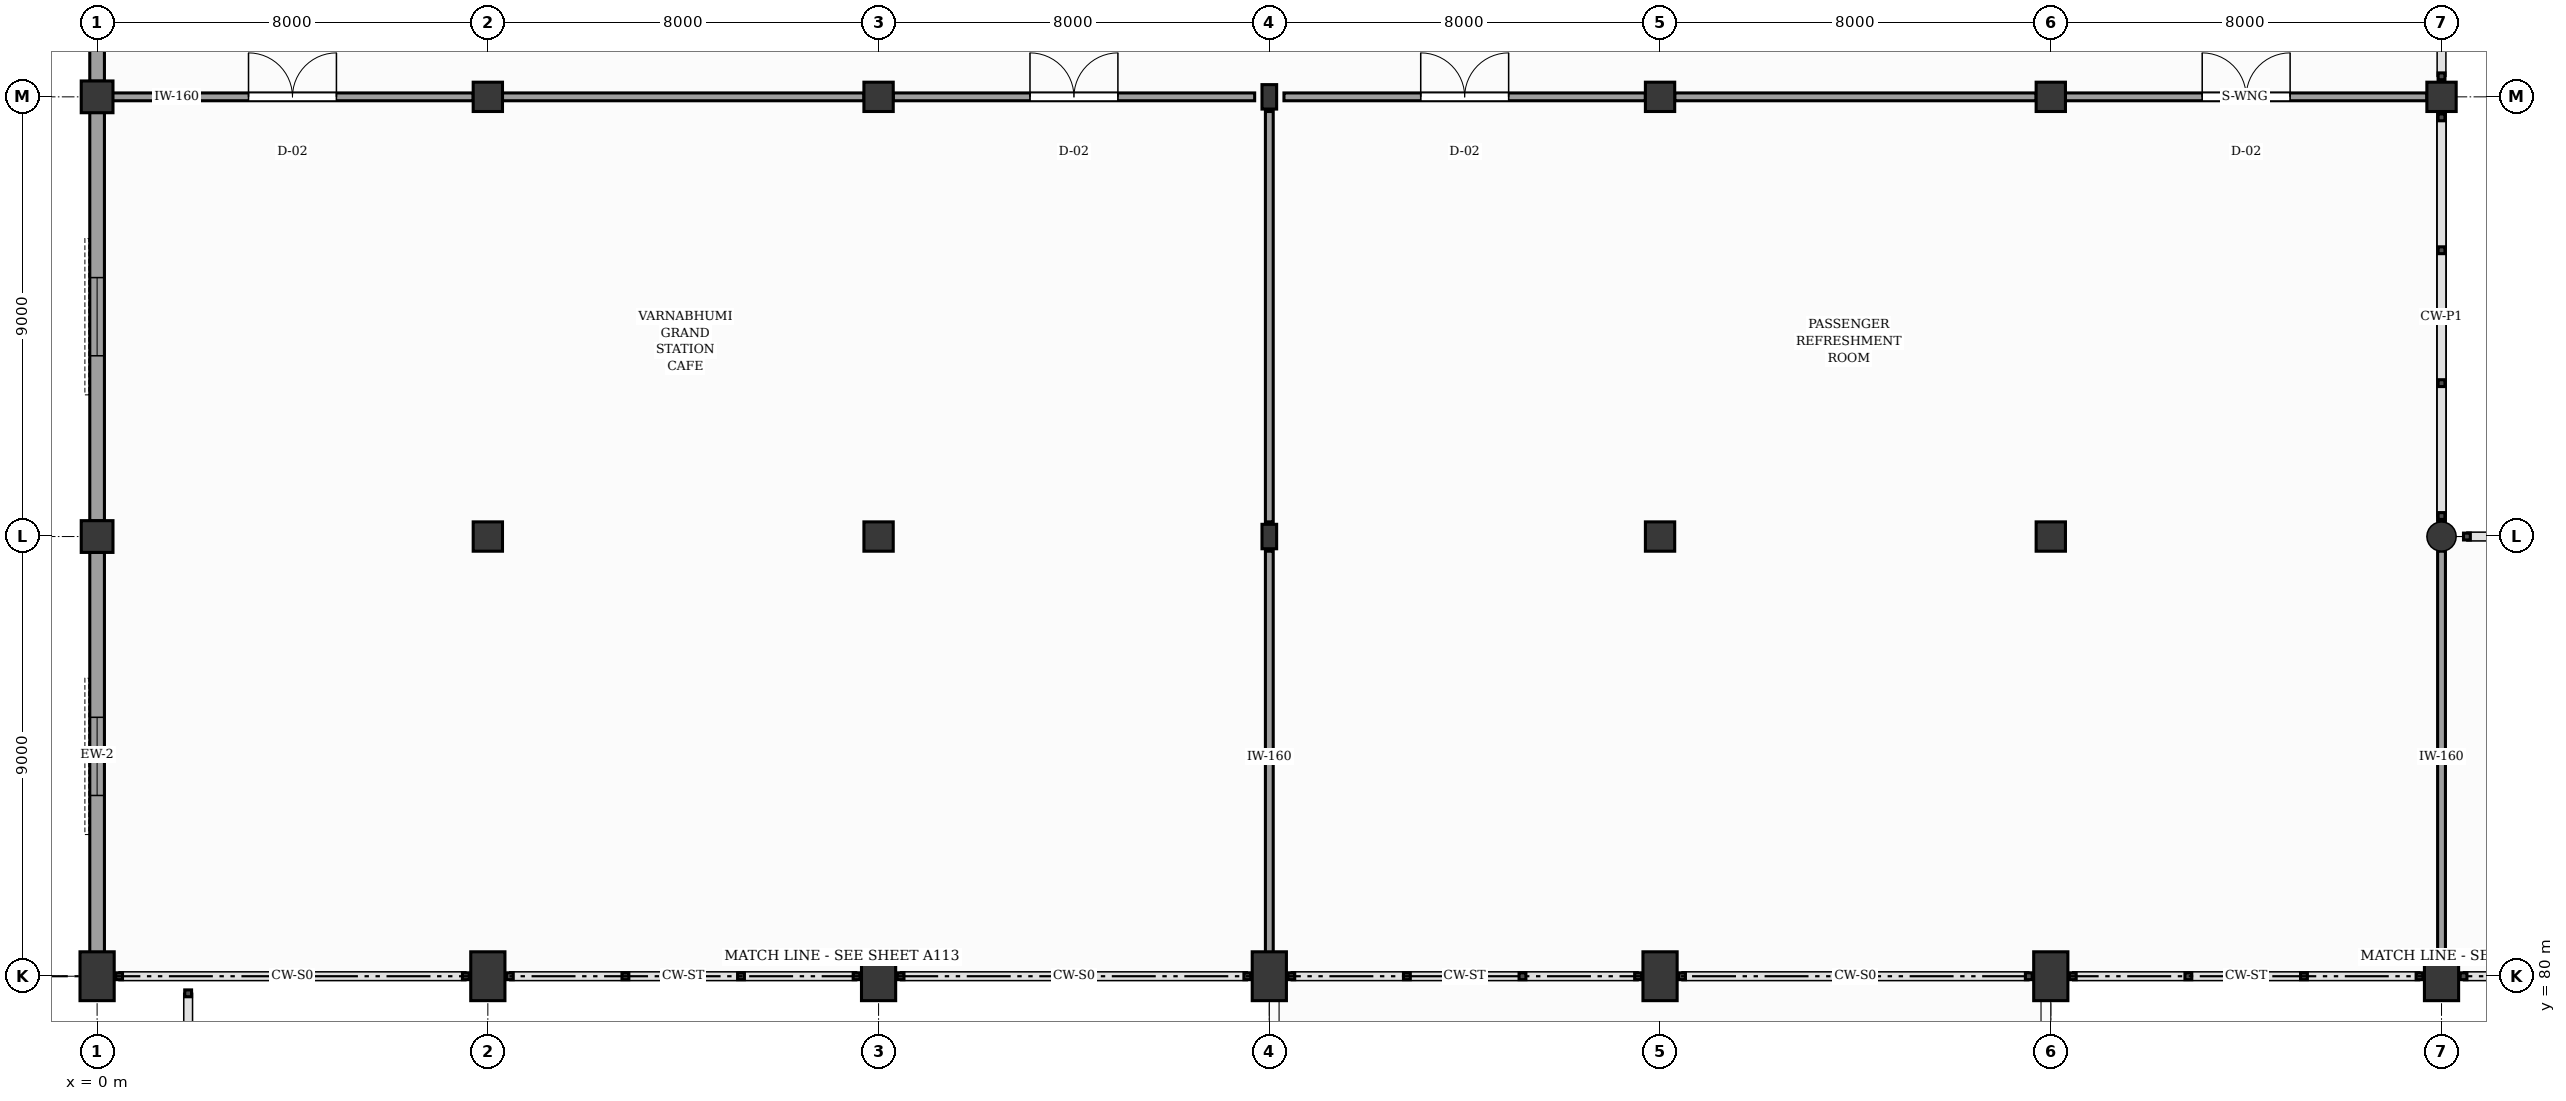
"""IFC4 building model, lengths in metres.
Left out: names, types, materials, properties, quantities, classifications, styles, units other than length and angle.
Written with IfcOpenShell. Run it as: python <this file> out.ifc"""

import sys

from ifc_helpers import new_model, si_unit, direction, frame, frame_2d, origin, origin_2d, place, context, subcontext, project, spatial, rectangle, circle, i_section, extrude, element, fill, save


model = new_model("IFC4")
c1 = context("Model", 3, precision=1e-05, world=origin(), true_north=direction((0.0, 1.0)))
c2 = subcontext(c1, "Body", "Model", "MODEL_VIEW")
j1 = project(units=[si_unit("LENGTHUNIT", "METRE"), si_unit("PLANEANGLEUNIT", "RADIAN")], contexts=[c1])
p1 = place(None, origin())
s1 = spatial("IfcSite", under=j1, at=p1, CompositionType="ELEMENT")
p2 = place(p1, origin())
s2 = spatial("IfcBuilding", under=s1, at=p2, CompositionType="ELEMENT")
p3 = place(p2, frame((0.0, 0.0, 4.8)))
s3 = spatial("IfcBuildingStorey", under=s2, at=p3, CompositionType="ELEMENT", Elevation=4.8)
p4 = place(p3, frame((0.0, 80.0, 0.0), z_axis=(0.0, 0.0, 1.0), x_axis=(1.0, 0.0, 0.0)))
e1 = element("IfcColumn", 1, at=p4, inside=s3, PredefinedType="COLUMN", context=c2, shape_type="SweptSolid", body=[
    extrude(rectangle(XDim=0.7, YDim=1.0, at=origin_2d()), origin(), (0.0, 0.0, 1.0), 4.8),
])
for number, where, z_axis, x_axis in (
    (2, (0.0, 89.0, 0.0), (0.0, 0.0, 1.0), (1.0, 0.0, 0.0)),
    (3, (0.0, 98.0, 0.0), (0.0, 0.0, 1.0), (1.0, 0.0, 0.0)),
):
    element("IfcColumn", number, at=place(p3, frame(where, z_axis=z_axis, x_axis=x_axis)), inside=s3, PredefinedType="COLUMN", context=c2, shape_type="SweptSolid", body=[
        extrude(rectangle(XDim=0.65, YDim=0.65, at=origin_2d()), origin(), (0.0, 0.0, 1.0), 4.8),
    ])
p5 = place(p3, frame((8.0, 80.0, 0.0), z_axis=(0.0, 0.0, 1.0), x_axis=(1.0, 0.0, 0.0)))
e4 = element("IfcColumn", 4, at=p5, inside=s3, PredefinedType="COLUMN", context=c2, shape_type="SweptSolid", body=[
    extrude(rectangle(XDim=0.7, YDim=1.0, at=origin_2d()), origin(), (0.0, 0.0, 1.0), 4.8),
])
for number, where, z_axis, x_axis in (
    (5, (8.0, 89.0, 0.0), (0.0, 0.0, 1.0), (1.0, 0.0, 0.0)),
    (6, (8.0, 98.0, 0.0), (0.0, 0.0, 1.0), (1.0, 0.0, 0.0)),
):
    element("IfcColumn", number, at=place(p3, frame(where, z_axis=z_axis, x_axis=x_axis)), inside=s3, PredefinedType="COLUMN", context=c2, shape_type="SweptSolid", body=[
        extrude(rectangle(XDim=0.6, YDim=0.6, at=origin_2d()), origin(), (0.0, 0.0, 1.0), 4.8),
    ])
p6 = place(p3, frame((16.0, 80.0, 0.0), z_axis=(0.0, 0.0, 1.0), x_axis=(1.0, 0.0, 0.0)))
e7 = element("IfcColumn", 7, at=p6, inside=s3, PredefinedType="COLUMN", context=c2, shape_type="SweptSolid", body=[
    extrude(rectangle(XDim=0.7, YDim=1.0, at=origin_2d()), origin(), (0.0, 0.0, 1.0), 4.8),
])
for number, where, z_axis, x_axis in (
    (8, (16.0, 89.0, 0.0), (0.0, 0.0, 1.0), (1.0, 0.0, 0.0)),
    (9, (16.0, 98.0, 0.0), (0.0, 0.0, 1.0), (1.0, 0.0, 0.0)),
):
    element("IfcColumn", number, at=place(p3, frame(where, z_axis=z_axis, x_axis=x_axis)), inside=s3, PredefinedType="COLUMN", context=c2, shape_type="SweptSolid", body=[
        extrude(rectangle(XDim=0.6, YDim=0.6, at=origin_2d()), origin(), (0.0, 0.0, 1.0), 4.8),
    ])
p7 = place(p3, frame((24.0, 80.0, 0.0), z_axis=(0.0, 0.0, 1.0), x_axis=(1.0, 0.0, 0.0)))
e10 = element("IfcColumn", 10, at=p7, inside=s3, PredefinedType="COLUMN", context=c2, shape_type="SweptSolid", body=[
    extrude(rectangle(XDim=0.7, YDim=1.0, at=origin_2d()), origin(), (0.0, 0.0, 1.0), 4.8),
])
for number, where, z_axis, x_axis in (
    (11, (24.0, 89.0, 0.0), (0.0, 0.0, 1.0), (1.0, 0.0, 0.0)),
    (12, (24.0, 98.0, 0.0), (0.0, 0.0, 1.0), (1.0, 0.0, 0.0)),
):
    element("IfcColumn", number, at=place(p3, frame(where, z_axis=z_axis, x_axis=x_axis)), inside=s3, PredefinedType="COLUMN", context=c2, shape_type="SweptSolid", body=[
        extrude(i_section(OverallWidth=0.3, OverallDepth=0.5, WebThickness=0.014, FlangeThickness=0.028, FilletRadius=0.027, at=origin_2d()), origin(), (0.0, 0.0, 1.0), 4.8),
    ])
p8 = place(p3, frame((32.0, 80.0, 0.0), z_axis=(0.0, 0.0, 1.0), x_axis=(1.0, 0.0, 0.0)))
e13 = element("IfcColumn", 13, at=p8, inside=s3, PredefinedType="COLUMN", context=c2, shape_type="SweptSolid", body=[
    extrude(rectangle(XDim=0.7, YDim=1.0, at=origin_2d()), origin(), (0.0, 0.0, 1.0), 4.8),
])
for number, where, z_axis, x_axis in (
    (14, (32.0, 89.0, 0.0), (0.0, 0.0, 1.0), (1.0, 0.0, 0.0)),
    (15, (32.0, 98.0, 0.0), (0.0, 0.0, 1.0), (1.0, 0.0, 0.0)),
):
    element("IfcColumn", number, at=place(p3, frame(where, z_axis=z_axis, x_axis=x_axis)), inside=s3, PredefinedType="COLUMN", context=c2, shape_type="SweptSolid", body=[
        extrude(rectangle(XDim=0.6, YDim=0.6, at=origin_2d()), origin(), (0.0, 0.0, 1.0), 4.8),
    ])
p9 = place(p3, frame((40.0, 80.0, 0.0), z_axis=(0.0, 0.0, 1.0), x_axis=(1.0, 0.0, 0.0)))
e16 = element("IfcColumn", 16, at=p9, inside=s3, PredefinedType="COLUMN", context=c2, shape_type="SweptSolid", body=[
    extrude(rectangle(XDim=0.7, YDim=1.0, at=origin_2d()), origin(), (0.0, 0.0, 1.0), 4.8),
])
for number, where, z_axis, x_axis in (
    (17, (40.0, 89.0, 0.0), (0.0, 0.0, 1.0), (1.0, 0.0, 0.0)),
    (18, (40.0, 98.0, 0.0), (0.0, 0.0, 1.0), (1.0, 0.0, 0.0)),
):
    element("IfcColumn", number, at=place(p3, frame(where, z_axis=z_axis, x_axis=x_axis)), inside=s3, PredefinedType="COLUMN", context=c2, shape_type="SweptSolid", body=[
        extrude(rectangle(XDim=0.6, YDim=0.6, at=origin_2d()), origin(), (0.0, 0.0, 1.0), 4.8),
    ])
p10 = place(p3, frame((48.0, 80.0, 0.0), z_axis=(0.0, 0.0, 1.0), x_axis=(1.0, 0.0, 0.0)))
e19 = element("IfcColumn", 19, at=p10, inside=s3, PredefinedType="COLUMN", context=c2, shape_type="SweptSolid", body=[
    extrude(rectangle(XDim=0.7, YDim=1.0, at=origin_2d()), origin(), (0.0, 0.0, 1.0), 4.8),
])
p11 = place(p3, frame((48.0, 89.0, 0.0), z_axis=(0.0, 0.0, 1.0), x_axis=(1.0, 0.0, 0.0)))
e20 = element("IfcColumn", 20, at=p11, inside=s3, PredefinedType="COLUMN", context=c2, shape_type="SweptSolid", body=[
    extrude(circle(Radius=0.3, at=origin_2d()), origin(), (0.0, 0.0, 1.0), 4.8),
])
p12 = place(p3, frame((48.0, 98.0, 0.0), z_axis=(0.0, 0.0, 1.0), x_axis=(1.0, 0.0, 0.0)))
e21 = element("IfcColumn", 21, at=p12, inside=s3, PredefinedType="COLUMN", context=c2, shape_type="SweptSolid", body=[
    extrude(rectangle(XDim=0.6, YDim=0.6, at=origin_2d()), origin(), (0.0, 0.0, 1.0), 4.8),
])
p13 = place(p3, frame((0.0, 80.4, 0.0), z_axis=(0.0, 0.0, 1.0), x_axis=(0.0, 1.0, 0.0)))
e22 = element("IfcWall", 22, at=p13, inside=s3, PredefinedType="SOLIDWALL", context=c2, shape_type="SweptSolid", body=[
    extrude(rectangle(XDim=8.28, YDim=0.3, at=frame_2d((4.14, 0.0))), origin(), (0.0, 0.0, 1.0), 3.31),
])
p14 = place(p13, frame((3.3, 0.0, 0.95)))
e23 = element("IfcOpeningElement", 23, at=p14, cuts=e22, PredefinedType="OPENING", context=c2, shape_type="SweptSolid", body=[
    extrude(rectangle(XDim=1.6, YDim=2.1, at=frame_2d((0.8, 1.05))), frame((0.0, 0.16, 0.0), z_axis=(0.0, -1.0, 0.0), x_axis=(1.0, 0.0, 0.0)), (0.0, 0.0, 1.0), 0.32),
])
p15 = place(p3, frame((0.0, 89.32, 0.0), z_axis=(0.0, 0.0, 1.0), x_axis=(0.0, 1.0, 0.0)))
e24 = element("IfcWall", 24, at=p15, inside=s3, PredefinedType="SOLIDWALL", context=c2, shape_type="SweptSolid", body=[
    extrude(rectangle(XDim=8.36, YDim=0.3, at=frame_2d((4.18, 0.0))), origin(), (0.0, 0.0, 1.0), 3.71),
])
p16 = place(p15, frame((3.38, 0.0, 0.95)))
e25 = element("IfcOpeningElement", 25, at=p16, cuts=e24, PredefinedType="OPENING", context=c2, shape_type="SweptSolid", body=[
    extrude(rectangle(XDim=1.6, YDim=2.1, at=frame_2d((0.8, 1.05))), frame((0.0, 0.16, 0.0), z_axis=(0.0, -1.0, 0.0), x_axis=(1.0, 0.0, 0.0)), (0.0, 0.0, 1.0), 0.32),
])
p17 = place(p3, frame((0.0, 98.32, 0.0), z_axis=(0.0, 0.0, 1.0), x_axis=(0.0, 1.0, 0.0)))
e26 = element("IfcWall", 26, at=p17, inside=s3, PredefinedType="SOLIDWALL", context=c2, shape_type="SweptSolid", body=[
    extrude(rectangle(XDim=8.36, YDim=0.3, at=frame_2d((4.18, 0.0))), origin(), (0.0, 0.0, 1.0), 3.71),
])
p18 = place(p17, frame((3.38, 0.0, 0.95)))
e27 = element("IfcOpeningElement", 27, at=p18, cuts=e26, PredefinedType="OPENING", context=c2, shape_type="SweptSolid", body=[
    extrude(rectangle(XDim=1.6, YDim=2.1, at=frame_2d((0.8, 1.05))), frame((0.0, 0.16, 0.0), z_axis=(0.0, -1.0, 0.0), x_axis=(1.0, 0.0, 0.0)), (0.0, 0.0, 1.0), 0.32),
])
p19 = place(p3, frame((0.3, 98.0, 0.0), z_axis=(0.0, 0.0, 1.0), x_axis=(1.0, 0.0, 0.0)))
e28 = element("IfcWall", 28, at=p19, inside=s3, PredefinedType="PARTITIONING", context=c2, shape_type="SweptSolid", body=[
    extrude(rectangle(XDim=7.4, YDim=0.16, at=frame_2d((3.7, 0.0))), origin(), (0.0, 0.0, 1.0), 3.7),
])
p20 = place(p19, frame((2.8, 0.0, 0.0)))
e29 = element("IfcOpeningElement", 29, at=p20, cuts=e28, PredefinedType="OPENING", context=c2, shape_type="SweptSolid", body=[
    extrude(rectangle(XDim=1.8, YDim=2.25, at=frame_2d((0.9, 1.125))), frame((0.0, 0.09, 0.0), z_axis=(0.0, -1.0, 0.0), x_axis=(1.0, 0.0, 0.0)), (0.0, 0.0, 1.0), 0.18),
])
p21 = place(p3, frame((8.3, 98.0, 0.0), z_axis=(0.0, 0.0, 1.0), x_axis=(1.0, 0.0, 0.0)))
e30 = element("IfcWall", 30, at=p21, inside=s3, PredefinedType="PARTITIONING", context=c2, shape_type="SweptSolid", body=[
    extrude(rectangle(XDim=7.4, YDim=0.16, at=frame_2d((3.7, 0.0))), origin(), (0.0, 0.0, 1.0), 3.7),
])
p22 = place(p3, frame((16.3, 98.0, 0.0), z_axis=(0.0, 0.0, 1.0), x_axis=(1.0, 0.0, 0.0)))
e31 = element("IfcWall", 31, at=p22, inside=s3, PredefinedType="PARTITIONING", context=c2, shape_type="SweptSolid", body=[
    extrude(rectangle(XDim=7.4, YDim=0.16, at=frame_2d((3.7, 0.0))), origin(), (0.0, 0.0, 1.0), 3.7),
])
p23 = place(p22, frame((2.8, 0.0, 0.0)))
e32 = element("IfcOpeningElement", 32, at=p23, cuts=e31, PredefinedType="OPENING", context=c2, shape_type="SweptSolid", body=[
    extrude(rectangle(XDim=1.8, YDim=2.25, at=frame_2d((0.9, 1.125))), frame((0.0, 0.09, 0.0), z_axis=(0.0, -1.0, 0.0), x_axis=(1.0, 0.0, 0.0)), (0.0, 0.0, 1.0), 0.18),
])
p24 = place(p3, frame((24.0, 80.3, 0.0), z_axis=(0.0, 0.0, 1.0), x_axis=(0.0, 1.0, 0.0)))
e33 = element("IfcWall", 33, at=p24, inside=s3, PredefinedType="PARTITIONING", context=c2, shape_type="SweptSolid", body=[
    extrude(rectangle(XDim=8.4, YDim=0.16, at=frame_2d((4.2, 0.0))), origin(), (0.0, 0.0, 1.0), 3.31),
])
p25 = place(p3, frame((24.0, 89.3, 0.0), z_axis=(0.0, 0.0, 1.0), x_axis=(0.0, 1.0, 0.0)))
e34 = element("IfcWall", 34, at=p25, inside=s3, PredefinedType="PARTITIONING", context=c2, shape_type="SweptSolid", body=[
    extrude(rectangle(XDim=8.4, YDim=0.16, at=frame_2d((4.2, 0.0))), origin(), (0.0, 0.0, 1.0), 3.7),
])
p26 = place(p3, frame((24.3, 98.0, 0.0), z_axis=(0.0, 0.0, 1.0), x_axis=(1.0, 0.0, 0.0)))
e35 = element("IfcWall", 35, at=p26, inside=s3, PredefinedType="PARTITIONING", context=c2, shape_type="SweptSolid", body=[
    extrude(rectangle(XDim=7.4, YDim=0.16, at=frame_2d((3.7, 0.0))), origin(), (0.0, 0.0, 1.0), 3.7),
])
p27 = place(p26, frame((2.8, 0.0, 0.0)))
e36 = element("IfcOpeningElement", 36, at=p27, cuts=e35, PredefinedType="OPENING", context=c2, shape_type="SweptSolid", body=[
    extrude(rectangle(XDim=1.8, YDim=2.25, at=frame_2d((0.9, 1.125))), frame((0.0, 0.09, 0.0), z_axis=(0.0, -1.0, 0.0), x_axis=(1.0, 0.0, 0.0)), (0.0, 0.0, 1.0), 0.18),
])
p28 = place(p3, frame((32.3, 98.0, 0.0), z_axis=(0.0, 0.0, 1.0), x_axis=(1.0, 0.0, 0.0)))
e37 = element("IfcWall", 37, at=p28, inside=s3, PredefinedType="PARTITIONING", context=c2, shape_type="SweptSolid", body=[
    extrude(rectangle(XDim=7.4, YDim=0.16, at=frame_2d((3.7, 0.0))), origin(), (0.0, 0.0, 1.0), 3.7),
])
p29 = place(p3, frame((40.3, 98.0, 0.0), z_axis=(0.0, 0.0, 1.0), x_axis=(1.0, 0.0, 0.0)))
e38 = element("IfcWall", 38, at=p29, inside=s3, PredefinedType="PARTITIONING", context=c2, shape_type="SweptSolid", body=[
    extrude(rectangle(XDim=7.4, YDim=0.16, at=frame_2d((3.7, 0.0))), origin(), (0.0, 0.0, 1.0), 3.7),
])
p30 = place(p29, frame((2.8, 0.0, 0.0)))
e39 = element("IfcOpeningElement", 39, at=p30, cuts=e38, PredefinedType="OPENING", context=c2, shape_type="SweptSolid", body=[
    extrude(rectangle(XDim=1.8, YDim=2.25, at=frame_2d((0.9, 1.125))), frame((0.0, 0.09, 0.0), z_axis=(0.0, -1.0, 0.0), x_axis=(1.0, 0.0, 0.0)), (0.0, 0.0, 1.0), 0.18),
])
p31 = place(p3, frame((48.0, 80.3, 0.0), z_axis=(0.0, 0.0, 1.0), x_axis=(0.0, 1.0, 0.0)))
e40 = element("IfcWall", 40, at=p31, inside=s3, PredefinedType="PARTITIONING", context=c2, shape_type="SweptSolid", body=[
    extrude(rectangle(XDim=8.4, YDim=0.16, at=frame_2d((4.2, 0.0))), origin(), (0.0, 0.0, 1.0), 3.31),
])
p32 = place(p3, frame((48.0, 89.3, 0.0), z_axis=(0.0, 0.0, 1.0), x_axis=(0.0, 1.0, 0.0)))
e41 = element("IfcWall", 41, at=p32, inside=s3, PredefinedType="PARTITIONING", context=c2, shape_type="SweptSolid", body=[
    extrude(rectangle(XDim=8.4, YDim=0.16, at=frame_2d((4.2, 0.0))), origin(), (0.0, 0.0, 1.0), 3.7),
])
p33 = place(p14, origin())
e42 = element("IfcWindow", 42, at=p33, inside=s3, PartitioningType="SINGLE_PANEL", PredefinedType="WINDOW", context=c2, shape_type="SweptSolid", body=[
    extrude(rectangle(XDim=1.6, YDim=2.1, at=frame_2d((0.8, 1.05))), frame((0.0, 0.03, 0.0), z_axis=(0.0, -1.0, 0.0), x_axis=(1.0, 0.0, 0.0)), (0.0, 0.0, 1.0), 0.06),
])
fill(e23, e42)
p34 = place(p16, origin())
e43 = element("IfcWindow", 43, at=p34, inside=s3, PartitioningType="SINGLE_PANEL", PredefinedType="WINDOW", context=c2, shape_type="SweptSolid", body=[
    extrude(rectangle(XDim=1.6, YDim=2.1, at=frame_2d((0.8, 1.05))), frame((0.0, 0.03, 0.0), z_axis=(0.0, -1.0, 0.0), x_axis=(1.0, 0.0, 0.0)), (0.0, 0.0, 1.0), 0.06),
])
fill(e25, e43)
p35 = place(p20, origin())
e44 = element("IfcDoor", 44, at=p35, inside=s3, OperationType="DOUBLE_DOOR_SINGLE_SWING", PredefinedType="DOOR", context=c2, shape_type="SweptSolid", body=[
    extrude(rectangle(XDim=1.8, YDim=2.25, at=frame_2d((0.9, 1.125))), frame((0.0, 0.025, 0.0), z_axis=(0.0, -1.0, 0.0), x_axis=(1.0, 0.0, 0.0)), (0.0, 0.0, 1.0), 0.05),
])
fill(e29, e44)
p36 = place(p23, origin())
e45 = element("IfcDoor", 45, at=p36, inside=s3, OperationType="DOUBLE_DOOR_SINGLE_SWING", PredefinedType="DOOR", context=c2, shape_type="SweptSolid", body=[
    extrude(rectangle(XDim=1.8, YDim=2.25, at=frame_2d((0.9, 1.125))), frame((0.0, 0.025, 0.0), z_axis=(0.0, -1.0, 0.0), x_axis=(1.0, 0.0, 0.0)), (0.0, 0.0, 1.0), 0.05),
])
fill(e32, e45)
p37 = place(p27, origin())
e46 = element("IfcDoor", 46, at=p37, inside=s3, OperationType="DOUBLE_DOOR_SINGLE_SWING", PredefinedType="DOOR", context=c2, shape_type="SweptSolid", body=[
    extrude(rectangle(XDim=1.8, YDim=2.25, at=frame_2d((0.9, 1.125))), frame((0.0, 0.025, 0.0), z_axis=(0.0, -1.0, 0.0), x_axis=(1.0, 0.0, 0.0)), (0.0, 0.0, 1.0), 0.05),
])
fill(e36, e46)
p38 = place(p30, origin())
e47 = element("IfcDoor", 47, at=p38, inside=s3, OperationType="DOUBLE_DOOR_SINGLE_SWING", PredefinedType="DOOR", context=c2, shape_type="SweptSolid", body=[
    extrude(rectangle(XDim=1.8, YDim=2.25, at=frame_2d((0.9, 1.125))), frame((0.0, 0.025, 0.0), z_axis=(0.0, -1.0, 0.0), x_axis=(1.0, 0.0, 0.0)), (0.0, 0.0, 1.0), 0.05),
])
fill(e39, e47)
save(model, sys.argv[1])
